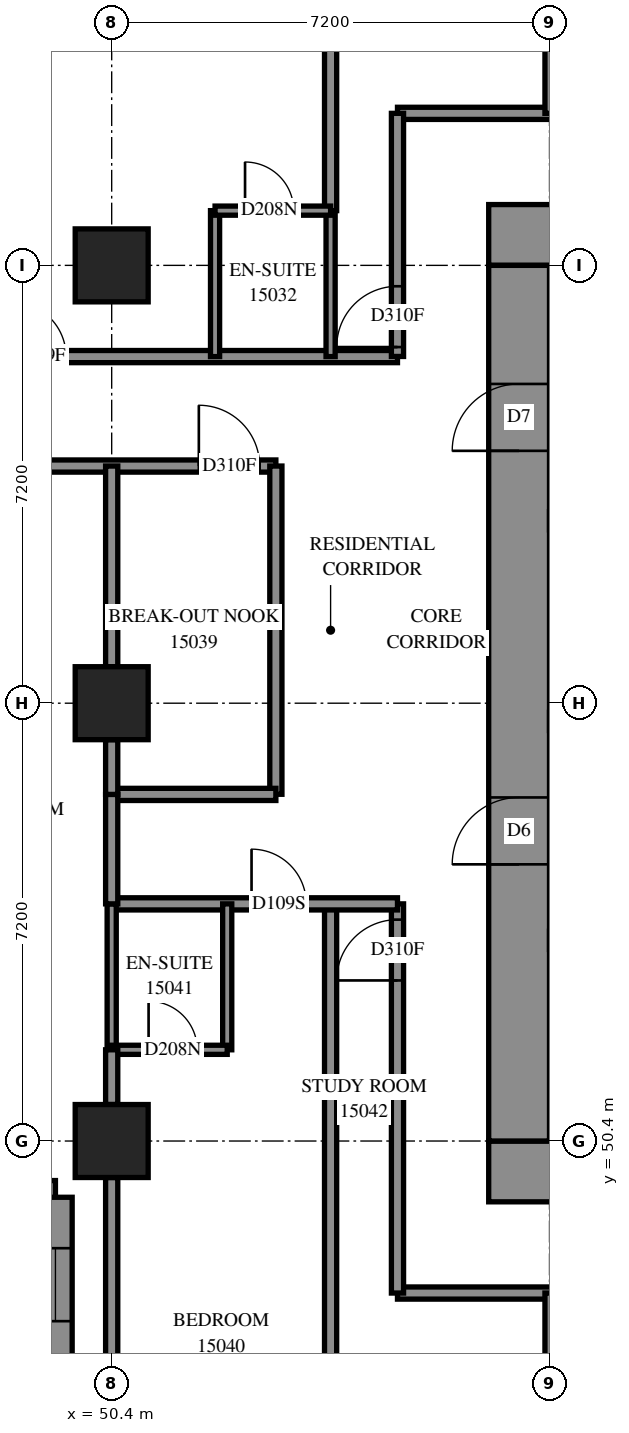
"""IFC4 building model, lengths in metres.
Left out: names, types, materials, properties, quantities, classifications, styles, units other than length and angle.
Written with IfcOpenShell. Run it as: python <this file> out.ifc"""

import sys

from ifc_helpers import new_model, si_unit, direction, frame, frame_2d, origin, origin_2d, place, context, subcontext, project, spatial, polyline, rectangle, outline, extrude, element, fill, save


model = new_model("IFC4")
c1 = context("Model", 3, precision=1e-05, world=origin(), true_north=direction((0.0, 1.0)))
c2 = subcontext(c1, "Body", "Model", "MODEL_VIEW")
j1 = project(units=[si_unit("LENGTHUNIT", "METRE"), si_unit("PLANEANGLEUNIT", "RADIAN")], contexts=[c1])
p1 = place(None, origin())
s1 = spatial("IfcSite", under=j1, at=p1, CompositionType="ELEMENT")
p2 = place(p1, origin())
s2 = spatial("IfcBuilding", under=s1, at=p2, CompositionType="ELEMENT")
p3 = place(p2, frame((0.0, 0.0, 57.6)))
s3 = spatial("IfcBuildingStorey", under=s2, at=p3, CompositionType="ELEMENT", Elevation=57.6)
for number, where, z_axis, x_axis in (
    (1, (50.4, 50.4, 0.0), (0.0, 0.0, 1.0), (1.0, 0.0, 0.0)),
    (2, (50.4, 57.6, 0.0), (0.0, 0.0, 1.0), (1.0, 0.0, 0.0)),
    (3, (50.4, 64.8, 0.0), (0.0, 0.0, 1.0), (1.0, 0.0, 0.0)),
):
    element("IfcColumn", number, at=place(p3, frame(where, z_axis=z_axis, x_axis=x_axis)), inside=s3, PredefinedType="COLUMN", context=c2, shape_type="SweptSolid", body=[
        extrude(rectangle(XDim=1.2, YDim=1.2, at=origin_2d()), origin(), (0.0, 0.0, 1.0), 3.1),
    ])
p4 = place(p3, frame((56.6, 49.9, -0.3), z_axis=(0.0, 0.0, 1.0), x_axis=(1.0, 0.0, 0.0)))
e4 = element("IfcWall", 4, at=p4, inside=s3, PredefinedType="SHEAR", context=c2, shape_type="SweptSolid", body=[
    extrude(rectangle(XDim=16.4, YDim=1.0, at=frame_2d((8.2, 0.0))), origin(), (0.0, 0.0, 1.0), 2.7),
])
p5 = place(p3, frame((56.6, 65.3, -0.3), z_axis=(0.0, 0.0, 1.0), x_axis=(1.0, 0.0, 0.0)))
e5 = element("IfcWall", 5, at=p5, inside=s3, PredefinedType="SHEAR", context=c2, shape_type="SweptSolid", body=[
    extrude(rectangle(XDim=16.4, YDim=1.0, at=frame_2d((8.2, 0.0))), origin(), (0.0, 0.0, 1.0), 2.7),
])
p6 = place(p5, frame((11.0, 0.0, 0.3)))
e6 = element("IfcOpeningElement", 6, at=p6, cuts=e5, PredefinedType="OPENING", context=c2, shape_type="SweptSolid", body=[
    extrude(rectangle(XDim=0.8, YDim=2.1, at=frame_2d((0.4, 1.05))), frame((0.0, 0.51, 0.0), z_axis=(0.0, -1.0, 0.0), x_axis=(1.0, 0.0, 0.0)), (0.0, 0.0, 1.0), 1.02),
])
p7 = place(p3, frame((57.1, 50.4, -0.3), z_axis=(0.0, 0.0, 1.0), x_axis=(0.0, 1.0, 0.0)))
e7 = element("IfcWall", 7, at=p7, inside=s3, PredefinedType="SHEAR", context=c2, shape_type="SweptSolid", body=[
    extrude(rectangle(XDim=14.4, YDim=1.0, at=frame_2d((7.2, 0.0))), origin(), (0.0, 0.0, 1.0), 2.7),
])
p8 = place(p7, frame((4.55, 0.0, 0.3)))
e8 = element("IfcOpeningElement", 8, at=p8, cuts=e7, PredefinedType="OPENING", context=c2, shape_type="SweptSolid", body=[
    extrude(rectangle(XDim=1.1, YDim=2.1, at=frame_2d((0.55, 1.05))), frame((0.0, 0.51, 0.0), z_axis=(0.0, -1.0, 0.0), x_axis=(1.0, 0.0, 0.0)), (0.0, 0.0, 1.0), 1.02),
])
p9 = place(p7, frame((11.35, 0.0, 0.3)))
e9 = element("IfcOpeningElement", 9, at=p9, cuts=e7, PredefinedType="OPENING", context=c2, shape_type="SweptSolid", body=[
    extrude(rectangle(XDim=1.1, YDim=2.1, at=frame_2d((0.55, 1.05))), frame((0.0, 0.51, 0.0), z_axis=(0.0, -1.0, 0.0), x_axis=(1.0, 0.0, 0.0)), (0.0, 0.0, 1.0), 1.02),
])
p10 = place(p3, frame((42.275, 49.475, 0.0), z_axis=(0.0, 0.0, 1.0), x_axis=(1.0, 0.0, 0.0)))
e10 = element("IfcWall", 10, at=p10, inside=s3, PredefinedType="SOLIDWALL", context=c2, shape_type="SweptSolid", body=[
    extrude(outline(polyline([(-0.275, -0.275), (6.925, -0.275), (7.475, 0.275), (0.275, 0.275), (-0.275, -0.275)])), origin(), (0.0, 0.0, 1.0), 3.1),
])
p11 = place(p10, frame((1.325, 0.0, 0.5)))
e11 = element("IfcOpeningElement", 11, at=p11, cuts=e10, PredefinedType="OPENING", context=c2, shape_type="SweptSolid", body=[
    extrude(rectangle(XDim=2.8, YDim=2.45, at=frame_2d((1.4, 1.225))), frame((0.0, 0.285, 0.0), z_axis=(0.0, -1.0, 0.0), x_axis=(1.0, 0.0, 0.0)), (0.0, 0.0, 1.0), 0.57),
])
p12 = place(p10, frame((5.162, 0.0, 0.5)))
e12 = element("IfcOpeningElement", 12, at=p12, cuts=e10, PredefinedType="OPENING", context=c2, shape_type="SweptSolid", body=[
    extrude(rectangle(XDim=1.2, YDim=2.45, at=frame_2d((0.6, 1.225))), frame((0.0, 0.285, 0.0), z_axis=(0.0, -1.0, 0.0), x_axis=(1.0, 0.0, 0.0)), (0.0, 0.0, 1.0), 0.57),
])
p13 = place(p3, frame((49.475, 49.475, 0.0), z_axis=(0.0, 0.0, 1.0), x_axis=(0.0, -1.0, 0.0)))
e13 = element("IfcWall", 13, at=p13, inside=s3, PredefinedType="SOLIDWALL", context=c2, shape_type="SweptSolid", body=[
    extrude(outline(polyline([(0.275, -0.275), (8.647, -0.275), (7.876, 0.275), (-0.275, 0.275), (0.275, -0.275)])), origin(), (0.0, 0.0, 1.0), 3.1),
])
p14 = place(p13, frame((3.075, 0.0, 0.5)))
e14 = element("IfcOpeningElement", 14, at=p14, cuts=e13, PredefinedType="OPENING", context=c2, shape_type="SweptSolid", body=[
    extrude(rectangle(XDim=2.8, YDim=2.45, at=frame_2d((1.4, 1.225))), frame((0.0, 0.285, 0.0), z_axis=(0.0, -1.0, 0.0), x_axis=(1.0, 0.0, 0.0)), (0.0, 0.0, 1.0), 0.57),
])
p15 = place(p13, frame((0.838, 0.0, 0.5)))
e15 = element("IfcOpeningElement", 15, at=p15, cuts=e13, PredefinedType="OPENING", context=c2, shape_type="SweptSolid", body=[
    extrude(rectangle(XDim=1.2, YDim=2.45, at=frame_2d((0.6, 1.225))), frame((0.0, 0.285, 0.0), z_axis=(0.0, -1.0, 0.0), x_axis=(1.0, 0.0, 0.0)), (0.0, 0.0, 1.0), 0.57),
])
p16 = place(p3, frame((28.8, 61.5, 0.0), z_axis=(0.0, 0.0, 1.0), x_axis=(1.0, 0.0, 0.0)))
e16 = element("IfcWall", 16, at=p16, inside=s3, PredefinedType="PARTITIONING", context=c2, shape_type="SweptSolid", body=[
    extrude(rectangle(XDim=24.3, YDim=0.2, at=frame_2d((12.15, 0.0))), origin(), (0.0, 0.0, 1.0), 3.1),
])
p17 = place(p16, frame((3.899, 0.0, 0.0)))
e17 = element("IfcOpeningElement", 17, at=p17, cuts=e16, PredefinedType="OPENING", context=c2, shape_type="SweptSolid", body=[
    extrude(rectangle(XDim=0.9, YDim=2.1, at=frame_2d((0.45, 1.05))), frame((0.0, 0.11, 0.0), z_axis=(0.0, -1.0, 0.0), x_axis=(1.0, 0.0, 0.0)), (0.0, 0.0, 1.0), 0.22),
])
p18 = place(p16, frame((9.5, 0.0, 0.0)))
e18 = element("IfcOpeningElement", 18, at=p18, cuts=e16, PredefinedType="OPENING", context=c2, shape_type="SweptSolid", body=[
    extrude(rectangle(XDim=0.9, YDim=2.1, at=frame_2d((0.45, 1.05))), frame((0.0, 0.11, 0.0), z_axis=(0.0, -1.0, 0.0), x_axis=(1.0, 0.0, 0.0)), (0.0, 0.0, 1.0), 0.22),
])
p19 = place(p16, frame((11.307, 0.0, 0.0)))
e19 = element("IfcOpeningElement", 19, at=p19, cuts=e16, PredefinedType="OPENING", context=c2, shape_type="SweptSolid", body=[
    extrude(rectangle(XDim=1.0, YDim=2.1, at=frame_2d((0.5, 1.05))), frame((0.0, 0.11, 0.0), z_axis=(0.0, -1.0, 0.0), x_axis=(1.0, 0.0, 0.0)), (0.0, 0.0, 1.0), 0.22),
])
p20 = place(p16, frame((16.7, 0.0, 0.0)))
e20 = element("IfcOpeningElement", 20, at=p20, cuts=e16, PredefinedType="OPENING", context=c2, shape_type="SweptSolid", body=[
    extrude(rectangle(XDim=0.9, YDim=2.1, at=frame_2d((0.45, 1.05))), frame((0.0, 0.11, 0.0), z_axis=(0.0, -1.0, 0.0), x_axis=(1.0, 0.0, 0.0)), (0.0, 0.0, 1.0), 0.22),
])
p21 = place(p16, frame((18.508, 0.0, 0.0)))
e21 = element("IfcOpeningElement", 21, at=p21, cuts=e16, PredefinedType="OPENING", context=c2, shape_type="SweptSolid", body=[
    extrude(rectangle(XDim=1.0, YDim=2.1, at=frame_2d((0.5, 1.05))), frame((0.0, 0.11, 0.0), z_axis=(0.0, -1.0, 0.0), x_axis=(1.0, 0.0, 0.0)), (0.0, 0.0, 1.0), 0.22),
])
p22 = place(p16, frame((23.033, 0.0, 0.0)))
e22 = element("IfcOpeningElement", 22, at=p22, cuts=e16, PredefinedType="OPENING", context=c2, shape_type="SweptSolid", body=[
    extrude(rectangle(XDim=1.0, YDim=2.1, at=frame_2d((0.5, 1.05))), frame((0.0, 0.11, 0.0), z_axis=(0.0, -1.0, 0.0), x_axis=(1.0, 0.0, 0.0)), (0.0, 0.0, 1.0), 0.22),
])
p23 = place(p3, frame((33.302, 63.3, 0.0), z_axis=(0.0, 0.0, 1.0), x_axis=(1.0, 0.0, 0.0)))
e23 = element("IfcWall", 23, at=p23, inside=s3, PredefinedType="PARTITIONING", context=c2, shape_type="SweptSolid", body=[
    extrude(rectangle(XDim=21.798, YDim=0.2, at=frame_2d((10.899, 0.0))), origin(), (0.0, 0.0, 1.0), 3.1),
])
p24 = place(p23, frame((1.091, 0.0, 0.0)))
e24 = element("IfcOpeningElement", 24, at=p24, cuts=e23, PredefinedType="OPENING", context=c2, shape_type="SweptSolid", body=[
    extrude(rectangle(XDim=0.9, YDim=2.1, at=frame_2d((0.45, 1.05))), frame((0.0, 0.11, 0.0), z_axis=(0.0, -1.0, 0.0), x_axis=(1.0, 0.0, 0.0)), (0.0, 0.0, 1.0), 0.22),
])
p25 = place(p23, frame((8.248, 0.0, 0.0)))
e25 = element("IfcOpeningElement", 25, at=p25, cuts=e23, PredefinedType="OPENING", context=c2, shape_type="SweptSolid", body=[
    extrude(rectangle(XDim=0.9, YDim=2.1, at=frame_2d((0.45, 1.05))), frame((0.0, 0.11, 0.0), z_axis=(0.0, -1.0, 0.0), x_axis=(1.0, 0.0, 0.0)), (0.0, 0.0, 1.0), 0.22),
])
p26 = place(p23, frame((15.448, 0.0, 0.0)))
e26 = element("IfcOpeningElement", 26, at=p26, cuts=e23, PredefinedType="OPENING", context=c2, shape_type="SweptSolid", body=[
    extrude(rectangle(XDim=0.9, YDim=2.1, at=frame_2d((0.45, 1.05))), frame((0.0, 0.11, 0.0), z_axis=(0.0, -1.0, 0.0), x_axis=(1.0, 0.0, 0.0)), (0.0, 0.0, 1.0), 0.22),
])
p27 = place(p3, frame((55.1, 67.3, 0.0), z_axis=(0.0, 0.0, 1.0), x_axis=(1.0, 0.0, 0.0)))
e27 = element("IfcWall", 27, at=p27, inside=s3, PredefinedType="PARTITIONING", context=c2, shape_type="SweptSolid", body=[
    extrude(rectangle(XDim=19.4, YDim=0.2, at=frame_2d((9.7, 0.0))), origin(), (0.0, 0.0, 1.0), 3.1),
])
p28 = place(p27, frame((6.361, 0.0, 0.0)))
e28 = element("IfcOpeningElement", 28, at=p28, cuts=e27, PredefinedType="OPENING", context=c2, shape_type="SweptSolid", body=[
    extrude(rectangle(XDim=0.9, YDim=2.1, at=frame_2d((0.45, 1.05))), frame((0.0, 0.11, 0.0), z_axis=(0.0, -1.0, 0.0), x_axis=(1.0, 0.0, 0.0)), (0.0, 0.0, 1.0), 0.22),
])
p29 = place(p27, frame((13.561, 0.0, 0.0)))
e29 = element("IfcOpeningElement", 29, at=p29, cuts=e27, PredefinedType="OPENING", context=c2, shape_type="SweptSolid", body=[
    extrude(rectangle(XDim=0.9, YDim=2.1, at=frame_2d((0.45, 1.05))), frame((0.0, 0.11, 0.0), z_axis=(0.0, -1.0, 0.0), x_axis=(1.0, 0.0, 0.0)), (0.0, 0.0, 1.0), 0.22),
])
p30 = place(p3, frame((55.1, 47.9, 0.0), z_axis=(0.0, 0.0, 1.0), x_axis=(1.0, 0.0, 0.0)))
e30 = element("IfcWall", 30, at=p30, inside=s3, PredefinedType="PARTITIONING", context=c2, shape_type="SweptSolid", body=[
    extrude(rectangle(XDim=19.208, YDim=0.2, at=frame_2d((9.604, 0.0))), origin(), (0.0, 0.0, 1.0), 3.1),
])
p31 = place(p30, frame((6.399, 0.0, 0.0)))
e31 = element("IfcOpeningElement", 31, at=p31, cuts=e30, PredefinedType="OPENING", context=c2, shape_type="SweptSolid", body=[
    extrude(rectangle(XDim=0.9, YDim=2.1, at=frame_2d((0.45, 1.05))), frame((0.0, 0.11, 0.0), z_axis=(0.0, -1.0, 0.0), x_axis=(1.0, 0.0, 0.0)), (0.0, 0.0, 1.0), 0.22),
])
p32 = place(p30, frame((13.561, 0.0, 0.0)))
e32 = element("IfcOpeningElement", 32, at=p32, cuts=e30, PredefinedType="OPENING", context=c2, shape_type="SweptSolid", body=[
    extrude(rectangle(XDim=0.9, YDim=2.1, at=frame_2d((0.45, 1.05))), frame((0.0, 0.11, 0.0), z_axis=(0.0, -1.0, 0.0), x_axis=(1.0, 0.0, 0.0)), (0.0, 0.0, 1.0), 0.22),
])
p33 = place(p3, frame((54.0, 42.324, 0.0), z_axis=(0.0, 0.0, 1.0), x_axis=(0.0, 1.0, 0.0)))
e33 = element("IfcWall", 33, at=p33, inside=s3, PredefinedType="PARTITIONING", context=c2, shape_type="SweptSolid", body=[
    extrude(rectangle(XDim=11.976, YDim=0.2, at=frame_2d((5.988, 0.0))), origin(), (0.0, 0.0, 1.0), 3.1),
])
p34 = place(p3, frame((54.0, 65.7, 0.0), z_axis=(0.0, 0.0, 1.0), x_axis=(0.0, 1.0, 0.0)))
e34 = element("IfcWall", 34, at=p34, inside=s3, PredefinedType="PARTITIONING", context=c2, shape_type="SweptSolid", body=[
    extrude(rectangle(XDim=7.017, YDim=0.2, at=frame_2d((3.508, 0.0))), origin(), (0.0, 0.0, 1.0), 3.1),
])
p35 = place(p3, frame((55.1, 47.9, 0.0), z_axis=(0.0, 0.0, 1.0), x_axis=(0.0, 1.0, 0.0)))
e35 = element("IfcWall", 35, at=p35, inside=s3, PredefinedType="PARTITIONING", context=c2, shape_type="SweptSolid", body=[
    extrude(rectangle(XDim=6.4, YDim=0.2, at=frame_2d((3.2, 0.0))), origin(), (0.0, 0.0, 1.0), 3.1),
])
p36 = place(p35, frame((5.141, 0.0, 0.0)))
e36 = element("IfcOpeningElement", 36, at=p36, cuts=e35, PredefinedType="OPENING", context=c2, shape_type="SweptSolid", body=[
    extrude(rectangle(XDim=1.0, YDim=2.1, at=frame_2d((0.5, 1.05))), frame((0.0, 0.11, 0.0), z_axis=(0.0, -1.0, 0.0), x_axis=(1.0, 0.0, 0.0)), (0.0, 0.0, 1.0), 0.22),
])
p37 = place(p3, frame((50.4, 43.8, 0.0), z_axis=(0.0, 0.0, 1.0), x_axis=(0.0, 1.0, 0.0)))
e37 = element("IfcWall", 37, at=p37, inside=s3, PredefinedType="PARTITIONING", context=c2, shape_type="SweptSolid", body=[
    extrude(rectangle(XDim=6.0, YDim=0.2, at=frame_2d((3.0, 0.0))), origin(), (0.0, 0.0, 1.0), 2.6),
])
p38 = place(p3, frame((53.1, 56.102, 0.0), z_axis=(0.0, 0.0, 1.0), x_axis=(0.0, 1.0, 0.0)))
e38 = element("IfcWall", 38, at=p38, inside=s3, PredefinedType="PARTITIONING", context=c2, shape_type="SweptSolid", body=[
    extrude(rectangle(XDim=5.398, YDim=0.2, at=frame_2d((2.699, 0.0))), origin(), (0.0, 0.0, 1.0), 3.1),
])
p39 = place(p3, frame((50.4, 54.3, 0.0), z_axis=(0.0, 0.0, 1.0), x_axis=(1.0, 0.0, 0.0)))
e39 = element("IfcWall", 39, at=p39, inside=s3, PredefinedType="PARTITIONING", context=c2, shape_type="SweptSolid", body=[
    extrude(rectangle(XDim=4.7, YDim=0.2, at=frame_2d((2.35, 0.0))), origin(), (0.0, 0.0, 1.0), 3.1),
])
p40 = place(p39, frame((2.3, 0.0, 0.0)))
e40 = element("IfcOpeningElement", 40, at=p40, cuts=e39, PredefinedType="OPENING", context=c2, shape_type="SweptSolid", body=[
    extrude(rectangle(XDim=0.9, YDim=2.1, at=frame_2d((0.45, 1.05))), frame((0.0, 0.11, 0.0), z_axis=(0.0, -1.0, 0.0), x_axis=(1.0, 0.0, 0.0)), (0.0, 0.0, 1.0), 0.22),
])
p41 = place(p3, frame((55.1, 63.302, 0.0), z_axis=(0.0, 0.0, 1.0), x_axis=(0.0, 1.0, 0.0)))
e41 = element("IfcWall", 41, at=p41, inside=s3, PredefinedType="PARTITIONING", context=c2, shape_type="SweptSolid", body=[
    extrude(rectangle(XDim=3.998, YDim=0.2, at=frame_2d((1.999, 0.0))), origin(), (0.0, 0.0, 1.0), 3.1),
])
p42 = place(p41, frame((0.154, 0.0, 0.0)))
e42 = element("IfcOpeningElement", 42, at=p42, cuts=e41, PredefinedType="OPENING", context=c2, shape_type="SweptSolid", body=[
    extrude(rectangle(XDim=1.0, YDim=2.1, at=frame_2d((0.5, 1.05))), frame((0.0, 0.11, 0.0), z_axis=(0.0, -1.0, 0.0), x_axis=(1.0, 0.0, 0.0)), (0.0, 0.0, 1.0), 0.22),
])
p43 = place(p3, frame((50.4, 58.2, 0.0), z_axis=(0.0, 0.0, 1.0), x_axis=(0.0, 1.0, 0.0)))
e43 = element("IfcWall", 43, at=p43, inside=s3, PredefinedType="PARTITIONING", context=c2, shape_type="SweptSolid", body=[
    extrude(rectangle(XDim=3.3, YDim=0.2, at=frame_2d((1.65, 0.0))), origin(), (0.0, 0.0, 1.0), 3.1),
])
p44 = place(p3, frame((50.4, 56.1, 0.0), z_axis=(0.0, 0.0, 1.0), x_axis=(1.0, 0.0, 0.0)))
e44 = element("IfcWall", 44, at=p44, inside=s3, PredefinedType="PARTITIONING", context=c2, shape_type="SweptSolid", body=[
    extrude(rectangle(XDim=2.7, YDim=0.2, at=frame_2d((1.35, 0.0))), origin(), (0.0, 0.0, 1.0), 3.1),
])
for number, where, z_axis, x_axis in (
    (45, (52.1, 63.3, 0.0), (0.0, 0.0, 1.0), (0.0, 1.0, 0.0)),
    (46, (54.0, 63.3, 0.0), (0.0, 0.0, 1.0), (0.0, 1.0, 0.0)),
    (47, (57.6, 67.3, 0.0), (0.0, 0.0, 1.0), (0.0, 1.0, 0.0)),
    (48, (52.3, 51.9, 0.0), (0.0, 0.0, 1.0), (0.0, 1.0, 0.0)),
    (49, (50.4, 51.9, 0.0), (0.0, 0.0, 1.0), (0.0, 1.0, 0.0)),
    (50, (57.6, 45.5, 0.0), (0.0, 0.0, 1.0), (0.0, 1.0, 0.0)),
):
    element("IfcWall", number, at=place(p3, frame(where, z_axis=z_axis, x_axis=x_axis)), inside=s3, PredefinedType="PARTITIONING", context=c2, shape_type="SweptSolid", body=[
        extrude(rectangle(XDim=2.4, YDim=0.15, at=frame_2d((1.2, 0.0))), origin(), (0.0, 0.0, 1.0), 3.1),
    ])
p45 = place(p3, frame((52.1, 65.7, 0.0), z_axis=(0.0, 0.0, 1.0), x_axis=(1.0, 0.0, 0.0)))
e51 = element("IfcWall", 51, at=p45, inside=s3, PredefinedType="PARTITIONING", context=c2, shape_type="SweptSolid", body=[
    extrude(rectangle(XDim=1.9, YDim=0.15, at=frame_2d((0.95, 0.0))), origin(), (0.0, 0.0, 1.0), 3.1),
])
p46 = place(p45, frame((0.493, 0.0, 0.0)))
e52 = element("IfcOpeningElement", 52, at=p46, cuts=e51, PredefinedType="OPENING", context=c2, shape_type="SweptSolid", body=[
    extrude(rectangle(XDim=0.8, YDim=2.1, at=frame_2d((0.4, 1.05))), frame((0.0, 0.085, 0.0), z_axis=(0.0, -1.0, 0.0), x_axis=(1.0, 0.0, 0.0)), (0.0, 0.0, 1.0), 0.17),
])
p47 = place(p3, frame((50.4, 51.9, 0.0), z_axis=(0.0, 0.0, 1.0), x_axis=(1.0, 0.0, 0.0)))
e53 = element("IfcWall", 53, at=p47, inside=s3, PredefinedType="PARTITIONING", context=c2, shape_type="SweptSolid", body=[
    extrude(rectangle(XDim=1.9, YDim=0.15, at=frame_2d((0.95, 0.0))), origin(), (0.0, 0.0, 1.0), 3.1),
])
p48 = place(p47, frame((0.607, 0.0, 0.0)))
e54 = element("IfcOpeningElement", 54, at=p48, cuts=e53, PredefinedType="OPENING", context=c2, shape_type="SweptSolid", body=[
    extrude(rectangle(XDim=0.8, YDim=2.1, at=frame_2d((0.4, 1.05))), frame((0.0, 0.085, 0.0), z_axis=(0.0, -1.0, 0.0), x_axis=(1.0, 0.0, 0.0)), (0.0, 0.0, 1.0), 0.17),
])
p49 = place(p3, frame((50.4, 54.3, 0.0), z_axis=(0.0, 0.0, 1.0), x_axis=(0.0, 1.0, 0.0)))
e55 = element("IfcWall", 55, at=p49, inside=s3, PredefinedType="PARTITIONING", context=c2, shape_type="SweptSolid", body=[
    extrude(rectangle(XDim=1.8, YDim=0.2, at=frame_2d((0.9, 0.0))), origin(), (0.0, 0.0, 1.0), 3.1),
])
for number, where, z_axis, x_axis in (
    (56, (50.4, 51.0, 0.0), (0.0, 0.0, 1.0), (0.0, 1.0, 0.0)),
    (57, (50.4, 56.1, 0.0), (0.0, 0.0, 1.0), (0.0, 1.0, 0.0)),
):
    element("IfcWall", number, at=place(p3, frame(where, z_axis=z_axis, x_axis=x_axis)), inside=s3, PredefinedType="PARTITIONING", context=c2, shape_type="SweptSolid", body=[
        extrude(rectangle(XDim=0.9, YDim=0.2, at=frame_2d((0.45, 0.0))), origin(), (0.0, 0.0, 1.0), 3.1),
    ])
p50 = place(p15, origin())
e58 = element("IfcWindow", 58, at=p50, inside=s3, PartitioningType="SINGLE_PANEL", PredefinedType="WINDOW", context=c2, shape_type="SweptSolid", body=[
    extrude(rectangle(XDim=1.2, YDim=2.45, at=frame_2d((0.6, 1.225))), frame((0.0, 0.155, 0.0), z_axis=(0.0, -1.0, 0.0), x_axis=(1.0, 0.0, 0.0)), (0.0, 0.0, 1.0), 0.06),
])
fill(e15, e58)
p51 = place(p8, origin())
e59 = element("IfcDoor", 59, at=p51, inside=s3, OperationType="DOUBLE_DOOR_SINGLE_SWING", PredefinedType="DOOR", context=c2, shape_type="SweptSolid", body=[
    extrude(rectangle(XDim=1.1, YDim=2.1, at=frame_2d((0.55, 1.05))), frame((0.0, 0.025, 0.0), z_axis=(0.0, -1.0, 0.0), x_axis=(1.0, 0.0, 0.0)), (0.0, 0.0, 1.0), 0.05),
])
fill(e8, e59)
p52 = place(p9, origin())
e60 = element("IfcDoor", 60, at=p52, inside=s3, OperationType="SINGLE_SWING_LEFT", PredefinedType="DOOR", context=c2, shape_type="SweptSolid", body=[
    extrude(rectangle(XDim=1.1, YDim=2.1, at=frame_2d((0.55, 1.05))), frame((0.0, 0.025, 0.0), z_axis=(0.0, -1.0, 0.0), x_axis=(1.0, 0.0, 0.0)), (0.0, 0.0, 1.0), 0.05),
])
fill(e9, e60)
p53 = place(p26, origin())
e61 = element("IfcDoor", 61, at=p53, inside=s3, OperationType="SINGLE_SWING_LEFT", PredefinedType="DOOR", context=c2, shape_type="SweptSolid", body=[
    extrude(rectangle(XDim=0.9, YDim=2.1, at=frame_2d((0.45, 1.05))), frame((0.0, 0.025, 0.0), z_axis=(0.0, -1.0, 0.0), x_axis=(1.0, 0.0, 0.0)), (0.0, 0.0, 1.0), 0.05),
])
fill(e26, e61)
p54 = place(p46, origin())
e62 = element("IfcDoor", 62, at=p54, inside=s3, OperationType="SINGLE_SWING_RIGHT", PredefinedType="DOOR", context=c2, shape_type="SweptSolid", body=[
    extrude(rectangle(XDim=0.8, YDim=2.1, at=frame_2d((0.4, 1.05))), frame((0.0, 0.025, 0.0), z_axis=(0.0, -1.0, 0.0), x_axis=(1.0, 0.0, 0.0)), (0.0, 0.0, 1.0), 0.05),
])
fill(e52, e62)
p55 = place(p42, origin())
e63 = element("IfcDoor", 63, at=p55, inside=s3, OperationType="SINGLE_SWING_LEFT", PredefinedType="DOOR", context=c2, shape_type="SweptSolid", body=[
    extrude(rectangle(XDim=1.0, YDim=2.1, at=frame_2d((0.5, 1.05))), frame((0.0, 0.025, 0.0), z_axis=(0.0, -1.0, 0.0), x_axis=(1.0, 0.0, 0.0)), (0.0, 0.0, 1.0), 0.05),
])
fill(e42, e63)
p56 = place(p22, origin())
e64 = element("IfcDoor", 64, at=p56, inside=s3, OperationType="SINGLE_SWING_LEFT", PredefinedType="DOOR", context=c2, shape_type="SweptSolid", body=[
    extrude(rectangle(XDim=1.0, YDim=2.1, at=frame_2d((0.5, 1.05))), frame((0.0, 0.025, 0.0), z_axis=(0.0, -1.0, 0.0), x_axis=(1.0, 0.0, 0.0)), (0.0, 0.0, 1.0), 0.05),
])
fill(e22, e64)
p57 = place(p40, origin())
e65 = element("IfcDoor", 65, at=p57, inside=s3, OperationType="SINGLE_SWING_LEFT", PredefinedType="DOOR", context=c2, shape_type="SweptSolid", body=[
    extrude(rectangle(XDim=0.9, YDim=2.1, at=frame_2d((0.45, 1.05))), frame((0.0, 0.025, 0.0), z_axis=(0.0, -1.0, 0.0), x_axis=(1.0, 0.0, 0.0)), (0.0, 0.0, 1.0), 0.05),
])
fill(e40, e65)
p58 = place(p48, origin())
e66 = element("IfcDoor", 66, at=p58, inside=s3, OperationType="SINGLE_SWING_RIGHT", PredefinedType="DOOR", context=c2, shape_type="SweptSolid", body=[
    extrude(rectangle(XDim=0.8, YDim=2.1, at=frame_2d((0.4, 1.05))), frame((0.0, 0.025, 0.0), z_axis=(0.0, -1.0, 0.0), x_axis=(1.0, 0.0, 0.0)), (0.0, 0.0, 1.0), 0.05),
])
fill(e54, e66)
p59 = place(p36, origin())
e67 = element("IfcDoor", 67, at=p59, inside=s3, OperationType="SINGLE_SWING_RIGHT", PredefinedType="DOOR", context=c2, shape_type="SweptSolid", body=[
    extrude(rectangle(XDim=1.0, YDim=2.1, at=frame_2d((0.5, 1.05))), frame((0.0, 0.025, 0.0), z_axis=(0.0, -1.0, 0.0), x_axis=(1.0, 0.0, 0.0)), (0.0, 0.0, 1.0), 0.05),
])
fill(e36, e67)
save(model, sys.argv[1])
